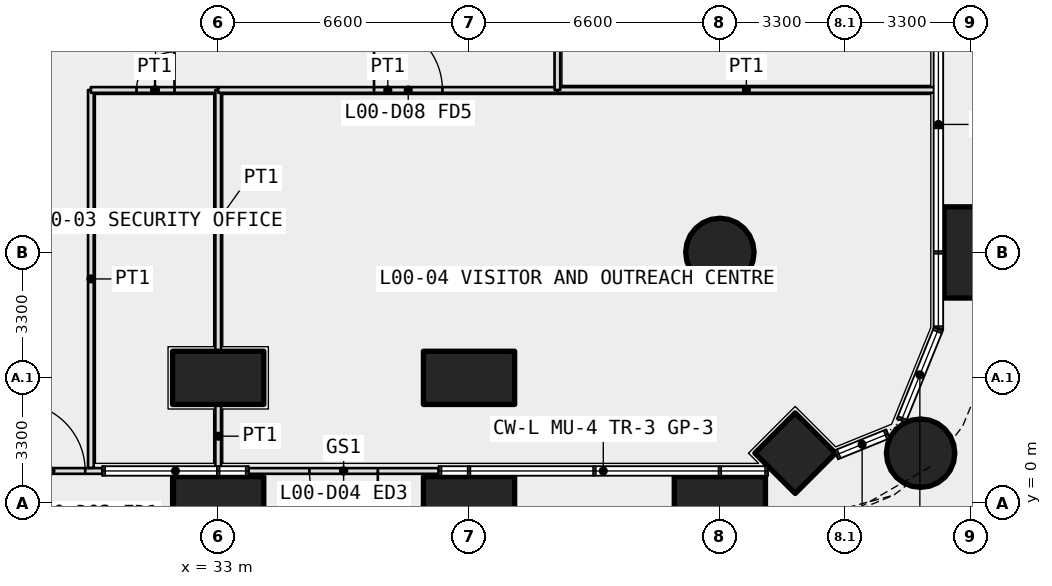
"""IFC4 building model, lengths in metres.
Left out: names, types, materials, properties, quantities, classifications, styles, units other than length and angle.
Written with IfcOpenShell. Run it as: python <this file> out.ifc"""

import sys

from ifc_helpers import new_model, si_unit, direction, frame, frame_2d, origin, origin_2d, place, context, subcontext, project, spatial, rectangle, circle, extrude, element, fill, save


model = new_model("IFC4")
c1 = context("Model", 3, precision=1e-05, world=origin(), true_north=direction((0.0, 1.0)))
c2 = subcontext(c1, "Body", "Model", "MODEL_VIEW")
j1 = project(units=[si_unit("LENGTHUNIT", "METRE"), si_unit("PLANEANGLEUNIT", "RADIAN")], contexts=[c1])
p1 = place(None, origin())
s1 = spatial("IfcSite", under=j1, at=p1, CompositionType="ELEMENT")
p2 = place(p1, origin())
s2 = spatial("IfcBuilding", under=s1, at=p2, CompositionType="ELEMENT")
p3 = place(p2, origin())
s3 = spatial("IfcBuildingStorey", under=s2, at=p3, CompositionType="ELEMENT", Elevation=0.0)
p4 = place(p3, frame((51.482, 1.318, 0.0), z_axis=(0.0, 0.0, 1.0), x_axis=(1.0, 0.0, 0.0)))
e1 = element("IfcColumn", 1, at=p4, inside=s3, PredefinedType="COLUMN", context=c2, shape_type="SweptSolid", body=[
    extrude(circle(Radius=0.9, at=origin_2d()), origin(), (0.0, 0.0, 1.0), 7.2),
])
for number, where, z_axis, x_axis in (
    (2, (33.0, 0.0, 0.0), (0.0, 0.0, 1.0), (1.0, 0.0, 0.0)),
    (3, (39.6, 0.0, 0.0), (0.0, 0.0, 1.0), (1.0, 0.0, 0.0)),
    (4, (46.2, 0.0, 0.0), (0.0, 0.0, 1.0), (1.0, 0.0, 0.0)),
    (5, (52.8, 6.6, 0.0), (0.0, 0.0, 1.0), (0.0, 1.0, 0.0)),
):
    element("IfcColumn", number, at=place(p3, frame(where, z_axis=z_axis, x_axis=x_axis)), inside=s3, PredefinedType="COLUMN", context=c2, shape_type="SweptSolid", body=[
        extrude(rectangle(XDim=2.4, YDim=1.4, at=origin_2d()), origin(), (0.0, 0.0, 1.0), 7.2),
    ])
p5 = place(p3, frame((46.2, 6.6, 0.0), z_axis=(0.0, 0.0, 1.0), x_axis=(1.0, 0.0, 0.0)))
e6 = element("IfcColumn", 6, at=p5, inside=s3, PredefinedType="COLUMN", context=c2, shape_type="SweptSolid", body=[
    extrude(circle(Radius=0.9, at=origin_2d()), origin(), (0.0, 0.0, 1.0), 7.2),
])
p6 = place(p3, frame((48.182, 1.318, 0.0), z_axis=(0.0, 0.0, 1.0), x_axis=(0.707106781187, 0.707106781187, 0.0)))
e7 = element("IfcColumn", 7, at=p6, inside=s3, PredefinedType="COLUMN", context=c2, shape_type="SweptSolid", body=[
    extrude(rectangle(XDim=1.5, YDim=1.5, at=origin_2d()), origin(), (0.0, 0.0, 1.0), 7.2),
])
for number, where, z_axis, x_axis in (
    (8, (33.0, 3.3, 0.0), (0.0, 0.0, 1.0), (1.0, 0.0, 0.0)),
    (9, (39.6, 3.3, 0.0), (0.0, 0.0, 1.0), (1.0, 0.0, 0.0)),
):
    element("IfcColumn", number, at=place(p3, frame(where, z_axis=z_axis, x_axis=x_axis)), inside=s3, PredefinedType="COLUMN", context=c2, shape_type="SweptSolid", body=[
        extrude(rectangle(XDim=2.4, YDim=1.4, at=origin_2d()), origin(), (0.0, 0.0, 1.0), 7.2),
    ])
p7 = place(p3, frame((22.85, 0.85, 0.0), z_axis=(0.0, 0.0, 1.0), x_axis=(1.0, 0.0, 0.0)))
e10 = element("IfcWall", 10, at=p7, inside=s3, PredefinedType="SOLIDWALL", context=c2, shape_type="SweptSolid", body=[
    extrude(rectangle(XDim=7.1, YDim=0.15, at=frame_2d((3.55, 0.0))), origin(), (0.0, 0.0, 1.0), 5.85),
])
p8 = place(p7, frame((0.45, 0.0, 0.0)))
e11 = element("IfcOpeningElement", 11, at=p8, cuts=e10, PredefinedType="OPENING", context=c2, shape_type="SweptSolid", body=[
    extrude(rectangle(XDim=1.8, YDim=3.0, at=frame_2d((0.9, 1.5))), frame((0.0, 0.085, 0.0), z_axis=(0.0, -1.0, 0.0), x_axis=(1.0, 0.0, 0.0)), (0.0, 0.0, 1.0), 0.17),
])
p9 = place(p7, frame((4.85, 0.0, 0.0)))
e12 = element("IfcOpeningElement", 12, at=p9, cuts=e10, PredefinedType="OPENING", context=c2, shape_type="SweptSolid", body=[
    extrude(rectangle(XDim=1.8, YDim=3.0, at=frame_2d((0.9, 1.5))), frame((0.0, 0.085, 0.0), z_axis=(0.0, -1.0, 0.0), x_axis=(1.0, 0.0, 0.0)), (0.0, 0.0, 1.0), 0.17),
])
p10 = place(p3, frame((38.8, 0.85, 0.0), z_axis=(0.0, 0.0, 1.0), x_axis=(-1.0, 0.0, 0.0)))
e13 = element("IfcWall", 13, at=p10, inside=s3, PredefinedType="SOLIDWALL", context=c2, shape_type="SweptSolid", body=[
    extrude(rectangle(XDim=5.0, YDim=0.15, at=frame_2d((2.5, 0.0))), origin(), (0.0, 0.0, 1.0), 6.9),
])
p11 = place(p10, frame((1.6, 0.0, 0.0)))
e14 = element("IfcOpeningElement", 14, at=p11, cuts=e13, PredefinedType="OPENING", context=c2, shape_type="SweptSolid", body=[
    extrude(rectangle(XDim=1.8, YDim=2.4, at=frame_2d((0.9, 1.2))), frame((0.0, 0.085, 0.0), z_axis=(0.0, -1.0, 0.0), x_axis=(1.0, 0.0, 0.0)), (0.0, 0.0, 1.0), 0.17),
])
p12 = place(p3, frame((29.65, 0.93, 0.0), z_axis=(0.0, 0.0, 1.0), x_axis=(0.0, 1.0, 0.0)))
e15 = element("IfcWall", 15, at=p12, inside=s3, PredefinedType="PARTITIONING", context=c2, shape_type="SweptSolid", body=[
    extrude(rectangle(XDim=9.945, YDim=0.15, at=frame_2d((4.973, 0.0))), origin(), (0.0, 0.0, 1.0), 6.9),
])
p13 = place(p3, frame((29.65, 10.875, 0.0), z_axis=(0.0, 0.0, 1.0), x_axis=(1.0, 0.0, 0.0)))
e16 = element("IfcWall", 16, at=p13, inside=s3, PredefinedType="PARTITIONING", context=c2, shape_type="SweptSolid", body=[
    extrude(rectangle(XDim=3.35, YDim=0.15, at=frame_2d((1.675, 0.0))), origin(), (0.0, 0.0, 1.0), 5.85),
])
p14 = place(p13, frame((1.2, 0.0, 0.0)))
e17 = element("IfcOpeningElement", 17, at=p14, cuts=e16, PredefinedType="OPENING", context=c2, shape_type="SweptSolid", body=[
    extrude(rectangle(XDim=1.0, YDim=2.1, at=frame_2d((0.5, 1.05))), frame((0.0, 0.085, 0.0), z_axis=(0.0, -1.0, 0.0), x_axis=(1.0, 0.0, 0.0)), (0.0, 0.0, 1.0), 0.17),
])
p15 = place(p3, frame((33.0, 10.875, 0.0), z_axis=(0.0, 0.0, 1.0), x_axis=(0.0, -1.0, 0.0)))
e18 = element("IfcWall", 18, at=p15, inside=s3, PredefinedType="PARTITIONING", context=c2, shape_type="SweptSolid", body=[
    extrude(rectangle(XDim=6.875, YDim=0.15, at=frame_2d((3.438, 0.0))), origin(), (0.0, 0.0, 1.0), 5.85),
])
p16 = place(p3, frame((33.0, 2.6, 0.0), z_axis=(0.0, 0.0, 1.0), x_axis=(0.0, -1.0, 0.0)))
e19 = element("IfcWall", 19, at=p16, inside=s3, PredefinedType="PARTITIONING", context=c2, shape_type="SweptSolid", body=[
    extrude(rectangle(XDim=1.67, YDim=0.15, at=frame_2d((0.835, 0.0))), origin(), (0.0, 0.0, 1.0), 5.85),
])
p17 = place(p3, frame((33.0, 10.875, 0.0), z_axis=(0.0, 0.0, 1.0), x_axis=(1.0, 0.0, 0.0)))
e20 = element("IfcWall", 20, at=p17, inside=s3, PredefinedType="PARTITIONING", context=c2, shape_type="SweptSolid", body=[
    extrude(rectangle(XDim=8.925, YDim=0.15, at=frame_2d((4.462, 0.0))), origin(), (0.0, 0.0, 1.0), 4.5),
])
p18 = place(p17, frame((4.1, 0.0, 0.0)))
e21 = element("IfcOpeningElement", 21, at=p18, cuts=e20, PredefinedType="OPENING", context=c2, shape_type="SweptSolid", body=[
    extrude(rectangle(XDim=1.8, YDim=2.1, at=frame_2d((0.9, 1.05))), frame((0.0, 0.085, 0.0), z_axis=(0.0, -1.0, 0.0), x_axis=(1.0, 0.0, 0.0)), (0.0, 0.0, 1.0), 0.17),
])
p19 = place(p3, frame((41.925, 10.875, 0.0), z_axis=(0.0, 0.0, 1.0), x_axis=(1.0, 0.0, 0.0)))
e22 = element("IfcWall", 22, at=p19, inside=s3, PredefinedType="PARTITIONING", context=c2, shape_type="SweptSolid", body=[
    extrude(rectangle(XDim=9.945, YDim=0.15, at=frame_2d((4.973, 0.0))), origin(), (0.0, 0.0, 1.0), 5.85),
])
p20 = place(p3, frame((41.925, 10.875, 0.0), z_axis=(0.0, 0.0, 1.0), x_axis=(0.0, 1.0, 0.0)))
e23 = element("IfcWall", 23, at=p20, inside=s3, PredefinedType="PARTITIONING", context=c2, shape_type="SweptSolid", body=[
    extrude(rectangle(XDim=8.925, YDim=0.15, at=frame_2d((4.462, 0.0))), origin(), (0.0, 0.0, 1.0), 5.85),
])
p21 = place(p20, frame((2.625, 0.0, 0.0)))
e24 = element("IfcOpeningElement", 24, at=p21, cuts=e23, PredefinedType="OPENING", context=c2, shape_type="SweptSolid", body=[
    extrude(rectangle(XDim=1.0, YDim=2.1, at=frame_2d((0.5, 1.05))), frame((0.0, 0.085, 0.0), z_axis=(0.0, -1.0, 0.0), x_axis=(1.0, 0.0, 0.0)), (0.0, 0.0, 1.0), 0.17),
])
p22 = place(p9, origin())
e25 = element("IfcDoor", 25, at=p22, inside=s3, OperationType="DOUBLE_DOOR_DOUBLE_SWING", PredefinedType="DOOR", context=c2, shape_type="SweptSolid", body=[
    extrude(rectangle(XDim=1.8, YDim=3.0, at=frame_2d((0.9, 1.5))), frame((0.0, 0.025, 0.0), z_axis=(0.0, -1.0, 0.0), x_axis=(1.0, 0.0, 0.0)), (0.0, 0.0, 1.0), 0.05),
])
fill(e12, e25)
p23 = place(p11, origin())
e26 = element("IfcDoor", 26, at=p23, inside=s3, OperationType="DOUBLE_DOOR_SINGLE_SWING", PredefinedType="DOOR", context=c2, shape_type="SweptSolid", body=[
    extrude(rectangle(XDim=1.8, YDim=2.4, at=frame_2d((0.9, 1.2))), frame((0.0, 0.025, 0.0), z_axis=(0.0, -1.0, 0.0), x_axis=(1.0, 0.0, 0.0)), (0.0, 0.0, 1.0), 0.05),
])
fill(e14, e26)
p24 = place(p14, origin())
e27 = element("IfcDoor", 27, at=p24, inside=s3, OperationType="SINGLE_SWING_RIGHT", PredefinedType="DOOR", context=c2, shape_type="SweptSolid", body=[
    extrude(rectangle(XDim=1.0, YDim=2.1, at=frame_2d((0.5, 1.05))), frame((0.0, 0.025, 0.0), z_axis=(0.0, -1.0, 0.0), x_axis=(1.0, 0.0, 0.0)), (0.0, 0.0, 1.0), 0.05),
])
fill(e17, e27)
p25 = place(p18, origin())
e28 = element("IfcDoor", 28, at=p25, inside=s3, OperationType="DOUBLE_DOOR_DOUBLE_SWING", PredefinedType="DOOR", context=c2, shape_type="SweptSolid", body=[
    extrude(rectangle(XDim=1.8, YDim=2.1, at=frame_2d((0.9, 1.05))), frame((0.0, 0.025, 0.0), z_axis=(0.0, -1.0, 0.0), x_axis=(1.0, 0.0, 0.0)), (0.0, 0.0, 1.0), 0.05),
])
fill(e21, e28)
save(model, sys.argv[1])
